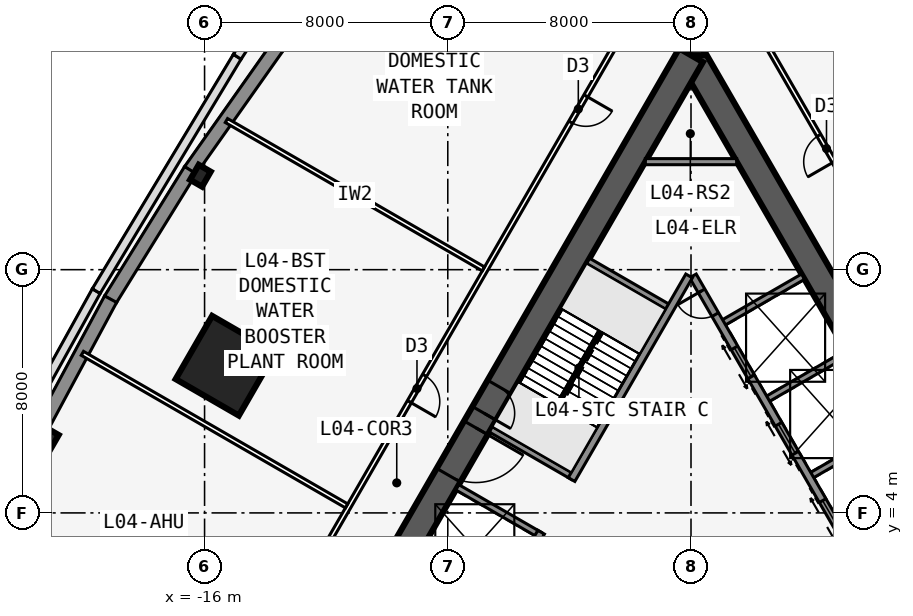
"""IFC4 building model, lengths in metres.
Left out: names, types, materials, properties, quantities, classifications, styles, units other than length and angle.
Written with IfcOpenShell. Run it as: python <this file> out.ifc"""

import sys

from ifc_helpers import new_model, si_unit, direction, frame, frame_2d, origin, origin_2d, place, context, subcontext, project, spatial, polyline, rectangle, i_section, outline, extrude, element, fill, save


model = new_model("IFC4")
c1 = context("Model", 3, precision=1e-05, world=origin(), true_north=direction((0.0, 1.0)))
c2 = subcontext(c1, "Body", "Model", "MODEL_VIEW")
j1 = project(units=[si_unit("LENGTHUNIT", "METRE"), si_unit("PLANEANGLEUNIT", "RADIAN")], contexts=[c1])
p1 = place(None, origin())
s1 = spatial("IfcSite", under=j1, at=p1, CompositionType="ELEMENT")
p2 = place(p1, origin())
s2 = spatial("IfcBuilding", under=s1, at=p2, CompositionType="ELEMENT")
p3 = place(p2, frame((0.0, 0.0, 22.5)))
s3 = spatial("IfcBuildingStorey", under=s2, at=p3, CompositionType="ELEMENT", Elevation=22.5)
p4 = place(p3, frame((16.5, -9.526, 0.0), z_axis=(0.0, 0.0, 1.0), x_axis=(-0.499999749417, 0.866025548458, 0.0)))
e1 = element("IfcWall", 1, at=p4, inside=s3, PredefinedType="SHEAR", context=c2, shape_type="SweptSolid", body=[
    extrude(rectangle(XDim=33.0, YDim=0.9, at=frame_2d((16.5, 0.0))), origin(), (0.0, 0.0, 1.0), 6.0),
])
p5 = place(p4, frame((14.15, 0.0, 0.0)))
e2 = element("IfcOpeningElement", 2, at=p5, cuts=e1, PredefinedType="OPENING", context=c2, shape_type="SweptSolid", body=[
    extrude(rectangle(XDim=1.8, YDim=2.13, at=frame_2d((0.9, 1.065))), frame((0.0, 0.46, 0.0), z_axis=(0.0, -1.0, 0.0), x_axis=(1.0, 0.0, 0.0)), (0.0, 0.0, 1.0), 0.92),
])
p6 = place(p4, frame((12.6, 0.0, 0.0)))
e3 = element("IfcOpeningElement", 3, at=p6, cuts=e1, PredefinedType="OPENING", context=c2, shape_type="SweptSolid", body=[
    extrude(rectangle(XDim=1.0, YDim=2.13, at=frame_2d((0.5, 1.065))), frame((0.0, 0.46, 0.0), z_axis=(0.0, -1.0, 0.0), x_axis=(1.0, 0.0, 0.0)), (0.0, 0.0, 1.0), 0.92),
])
p7 = place(p3, frame((5.379, 2.586, 0.0), z_axis=(0.0, 0.0, 1.0), x_axis=(-0.500001375892, 0.866024609411, 0.0)))
e4 = element("IfcWall", 4, at=p7, inside=s3, PredefinedType="SOLIDWALL", context=c2, shape_type="SweptSolid", body=[
    extrude(rectangle(XDim=10.633, YDim=0.25, at=frame_2d((5.316, 0.0))), origin(), (0.0, 0.0, 1.0), 5.835),
])
p8 = place(p7, frame((9.164, 0.0, 0.0)))
e5 = element("IfcOpeningElement", 5, at=p8, cuts=e4, PredefinedType="OPENING", context=c2, shape_type="SweptSolid", body=[
    extrude(rectangle(XDim=0.9, YDim=2.13, at=frame_2d((0.45, 1.065))), frame((0.0, 0.135, 0.0), z_axis=(0.0, -1.0, 0.0), x_axis=(1.0, 0.0, 0.0)), (0.0, 0.0, 1.0), 0.27),
])
p9 = place(p7, frame((1.0, 0.0, 0.0)))
e6 = element("IfcOpeningElement", 6, at=p9, cuts=e4, PredefinedType="OPENING", context=c2, shape_type="SweptSolid", body=[
    extrude(rectangle(XDim=1.1, YDim=2.13, at=frame_2d((0.55, 1.065))), frame((0.0, 0.135, 0.0), z_axis=(0.0, -1.0, 0.0), x_axis=(1.0, 0.0, 0.0)), (0.0, 0.0, 1.0), 0.27),
])
p10 = place(p7, frame((3.9, 0.0, 0.0)))
e7 = element("IfcOpeningElement", 7, at=p10, cuts=e4, PredefinedType="OPENING", context=c2, shape_type="SweptSolid", body=[
    extrude(rectangle(XDim=1.1, YDim=2.13, at=frame_2d((0.55, 1.065))), frame((0.0, 0.135, 0.0), z_axis=(0.0, -1.0, 0.0), x_axis=(1.0, 0.0, 0.0)), (0.0, 0.0, 1.0), 0.27),
])
p11 = place(p7, frame((6.8, 0.0, 0.0)))
e8 = element("IfcOpeningElement", 8, at=p11, cuts=e4, PredefinedType="OPENING", context=c2, shape_type="SweptSolid", body=[
    extrude(rectangle(XDim=1.1, YDim=2.13, at=frame_2d((0.55, 1.065))), frame((0.0, 0.135, 0.0), z_axis=(0.0, -1.0, 0.0), x_axis=(1.0, 0.0, 0.0)), (0.0, 0.0, 1.0), 0.27),
])
for number, where, z_axis, x_axis in (
    (9, (3.879, 5.184, 0.0), (0.0, 0.0, 1.0), (0.866, 0.5, 0.0)),
    (10, (2.429, 7.696, 0.0), (0.0, 0.0, 1.0), (0.866, 0.5, 0.0)),
    (11, (0.979, 10.207, 0.0), (0.0, 0.0, 1.0), (0.866, 0.5, 0.0)),
):
    element("IfcWall", number, at=place(p3, frame(where, z_axis=z_axis, x_axis=x_axis)), inside=s3, PredefinedType="SOLIDWALL", context=c2, shape_type="SweptSolid", body=[
        extrude(rectangle(XDim=3.125, YDim=0.2, at=frame_2d((1.562, 0.0))), origin(), (0.0, 0.0, 1.0), 5.835),
    ])
p12 = place(p3, frame((0.0, 19.052, 0.0), z_axis=(0.0, 0.0, 1.0), x_axis=(-0.499999749417, -0.866025548458, 0.0)))
e12 = element("IfcWall", 12, at=p12, inside=s3, PredefinedType="SHEAR", context=c2, shape_type="SweptSolid", body=[
    extrude(rectangle(XDim=33.0, YDim=0.9, at=frame_2d((16.5, 0.0))), origin(), (0.0, 0.0, 1.0), 6.0),
])
p13 = place(p12, frame((14.15, 0.0, 0.0)))
e13 = element("IfcOpeningElement", 13, at=p13, cuts=e12, PredefinedType="OPENING", context=c2, shape_type="SweptSolid", body=[
    extrude(rectangle(XDim=1.8, YDim=2.13, at=frame_2d((0.9, 1.065))), frame((0.0, 0.46, 0.0), z_axis=(0.0, -1.0, 0.0), x_axis=(1.0, 0.0, 0.0)), (0.0, 0.0, 1.0), 0.92),
])
p14 = place(p12, frame((12.6, 0.0, 0.0)))
e14 = element("IfcOpeningElement", 14, at=p14, cuts=e12, PredefinedType="OPENING", context=c2, shape_type="SweptSolid", body=[
    extrude(rectangle(XDim=1.0, YDim=2.13, at=frame_2d((0.5, 1.065))), frame((0.0, 0.46, 0.0), z_axis=(0.0, -1.0, 0.0), x_axis=(1.0, 0.0, 0.0)), (0.0, 0.0, 1.0), 0.92),
])
p15 = place(p3, frame((-0.062, 11.794, 0.0), z_axis=(0.0, 0.0, 1.0), x_axis=(-0.500006680225, -0.86602154692, 0.0)))
e15 = element("IfcWall", 15, at=p15, inside=s3, PredefinedType="SOLIDWALL", context=c2, shape_type="SweptSolid", body=[
    extrude(rectangle(XDim=7.733, YDim=0.25, at=frame_2d((3.866, 0.0))), origin(), (0.0, 0.0, 1.0), 5.835),
])
p16 = place(p3, frame((-4.929, 3.365, 0.0), z_axis=(0.0, 0.0, 1.0), x_axis=(-0.499991433582, -0.866030349552, 0.0)))
e16 = element("IfcWall", 16, at=p16, inside=s3, PredefinedType="SOLIDWALL", context=c2, shape_type="SweptSolid", body=[
    extrude(rectangle(XDim=10.633, YDim=0.25, at=frame_2d((5.316, 0.0))), origin(), (0.0, 0.0, 1.0), 5.835),
])
p17 = place(p16, frame((9.164, 0.0, 0.0)))
e17 = element("IfcOpeningElement", 17, at=p17, cuts=e16, PredefinedType="OPENING", context=c2, shape_type="SweptSolid", body=[
    extrude(rectangle(XDim=0.9, YDim=2.13, at=frame_2d((0.45, 1.065))), frame((0.0, 0.135, 0.0), z_axis=(0.0, -1.0, 0.0), x_axis=(1.0, 0.0, 0.0)), (0.0, 0.0, 1.0), 0.27),
])
for number, where, z_axis, x_axis in (
    (18, (-0.679, 10.727, 0.0), (0.0, 0.0, 1.0), (-0.866, 0.5, 0.0)),
    (19, (-3.879, 5.184, 0.0), (0.0, 0.0, 1.0), (-0.866, 0.5, 0.0)),
    (20, (-4.979, 3.279, 0.0), (0.0, 0.0, 1.0), (-0.866, 0.5, 0.0)),
):
    element("IfcWall", number, at=place(p3, frame(where, z_axis=z_axis, x_axis=x_axis)), inside=s3, PredefinedType="SOLIDWALL", context=c2, shape_type="SweptSolid", body=[
        extrude(rectangle(XDim=3.125, YDim=0.2, at=frame_2d((1.562, 0.0))), origin(), (0.0, 0.0, 1.0), 5.835),
    ])
p18 = place(p3, frame((0.0, 19.052, 0.0), z_axis=(0.0, 0.0, 1.0), x_axis=(0.0, 1.0, 0.0)))
e21 = element("IfcWall", 21, at=p18, inside=s3, PredefinedType="SHEAR", context=c2, shape_type="SweptSolid", body=[
    extrude(rectangle(XDim=4.746, YDim=0.9, at=frame_2d((2.373, 0.0))), origin(), (0.0, 0.0, 1.0), 6.0),
])
p19 = place(p18, frame((1.8, 0.0, 0.0)))
e22 = element("IfcOpeningElement", 22, at=p19, cuts=e21, PredefinedType="OPENING", context=c2, shape_type="SweptSolid", body=[
    extrude(rectangle(XDim=1.8, YDim=2.13, at=frame_2d((0.9, 1.065))), frame((0.0, 0.46, 0.0), z_axis=(0.0, -1.0, 0.0), x_axis=(1.0, 0.0, 0.0)), (0.0, 0.0, 1.0), 0.92),
])
for number, where, z_axis, x_axis in (
    (23, (-16.137, 15.09, 0.0), (0.0, 0.0, 1.0), (-0.866, 0.5, 0.0)),
    (24, (-21.137, 6.43, 0.0), (0.0, 0.0, 1.0), (-0.866, 0.5, 0.0)),
):
    element("IfcColumn", number, at=place(p3, frame(where, z_axis=z_axis, x_axis=x_axis)), inside=s3, PredefinedType="COLUMN", context=c2, shape_type="SweptSolid", body=[
        extrude(i_section(OverallWidth=0.455, OverallDepth=0.569, WebThickness=0.078, FlangeThickness=0.125, at=origin_2d()), origin(), (0.0, 0.0, 1.0), 6.0),
    ])
p20 = place(p3, frame((-15.312, 8.84, 0.0), z_axis=(0.0, 0.0, 1.0), x_axis=(-0.866025403784, 0.5, 0.0)))
e25 = element("IfcColumn", 25, at=p20, inside=s3, PredefinedType="COLUMN", context=c2, shape_type="SweptSolid", body=[
    extrude(rectangle(XDim=2.4, YDim=2.4, at=origin_2d()), origin(), (0.0, 0.0, 1.0), 6.0),
])
p21 = place(p3, frame((-13.578, 19.363, 0.0), z_axis=(0.0, 0.0, 1.0), x_axis=(-0.5766431066, -0.81699616132, 0.0)))
e26 = element("IfcWall", 26, at=p21, inside=s3, PredefinedType="SOLIDWALL", context=c2, shape_type="SweptSolid", body=[
    extrude(outline(polyline([(0.0, 0.0), (5.021, 0.0), (5.021, 5.835), (0.0, 5.835), (0.0, 0.0)]), holes=[polyline([(4.41, 2.917), (4.346, 3.409), (4.156, 3.867), (3.854, 4.261), (3.46, 4.563), (3.002, 4.753), (2.51, 4.817), (2.019, 4.753), (1.56, 4.563), (1.167, 4.261), (0.865, 3.867), (0.675, 3.409), (0.61, 2.917), (0.675, 2.426), (0.865, 1.968), (1.167, 1.574), (1.56, 1.272), (2.019, 1.082), (2.51, 1.018), (3.002, 1.082), (3.46, 1.272), (3.854, 1.574), (4.156, 1.968), (4.346, 2.426), (4.41, 2.917)])]), frame((0.0, 0.225, 0.0), z_axis=(0.0, -1.0, 0.0), x_axis=(1.0, 0.0, 0.0)), (0.0, 0.0, 1.0), 0.45),
])
p22 = place(p3, frame((-16.466, 15.272, 0.0), z_axis=(0.0, 0.0, 1.0), x_axis=(-0.52611097126, -0.850415925251, 0.0)))
e27 = element("IfcWall", 27, at=p22, inside=s3, PredefinedType="SOLIDWALL", context=c2, shape_type="SweptSolid", body=[
    extrude(outline(polyline([(0.0, 0.0), (5.002, 0.0), (5.002, 5.835), (0.0, 5.835), (0.0, 0.0)]), holes=[polyline([(4.401, 2.917), (4.336, 3.409), (4.146, 3.867), (3.844, 4.261), (3.451, 4.563), (2.993, 4.753), (2.501, 4.817), (2.01, 4.753), (1.551, 4.563), (1.158, 4.261), (0.856, 3.867), (0.666, 3.409), (0.601, 2.917), (0.666, 2.426), (0.856, 1.968), (1.158, 1.574), (1.551, 1.272), (2.01, 1.082), (2.501, 1.018), (2.993, 1.082), (3.451, 1.272), (3.844, 1.574), (4.146, 1.968), (4.336, 2.426), (4.401, 2.917)])]), frame((0.0, 0.225, 0.0), z_axis=(0.0, -1.0, 0.0), x_axis=(1.0, 0.0, 0.0)), (0.0, 0.0, 1.0), 0.45),
])
p23 = place(p3, frame((-19.09, 11.03, 0.0), z_axis=(0.0, 0.0, 1.0), x_axis=(-0.473412820489, -0.880840678782, 0.0)))
e28 = element("IfcWall", 28, at=p23, inside=s3, PredefinedType="SOLIDWALL", context=c2, shape_type="SweptSolid", body=[
    extrude(outline(polyline([(0.0, 0.0), (5.002, 0.0), (5.002, 5.835), (0.0, 5.835), (0.0, 0.0)]), holes=[polyline([(4.401, 2.917), (4.336, 3.409), (4.146, 3.867), (3.845, 4.261), (3.451, 4.563), (2.993, 4.753), (2.501, 4.817), (2.01, 4.753), (1.551, 4.563), (1.158, 4.261), (0.856, 3.867), (0.666, 3.409), (0.601, 2.917), (0.666, 2.426), (0.856, 1.968), (1.158, 1.574), (1.551, 1.272), (2.01, 1.082), (2.501, 1.018), (2.993, 1.082), (3.451, 1.272), (3.845, 1.574), (4.146, 1.968), (4.336, 2.426), (4.401, 2.917)])]), frame((0.0, 0.225, 0.0), z_axis=(0.0, -1.0, 0.0), x_axis=(1.0, 0.0, 0.0)), (0.0, 0.0, 1.0), 0.45),
])
p24 = place(p3, frame((-23.92, 3.424, 0.0), z_axis=(0.0, 0.0, 1.0), x_axis=(0.484315141127, 0.874893618719, 0.0)))
e29 = element("IfcWall", 29, at=p24, inside=s3, PredefinedType="PARAPET", context=c2, shape_type="SweptSolid", body=[
    extrude(rectangle(XDim=8.996, YDim=0.3, at=frame_2d((4.498, 0.0))), origin(), (0.0, 0.0, 1.0), 1.1),
])
p25 = place(p3, frame((-19.563, 11.295, 0.0), z_axis=(0.0, 0.0, 1.0), x_axis=(0.515513067343, 0.856881717274, 0.0)))
e30 = element("IfcWall", 30, at=p25, inside=s3, PredefinedType="PARAPET", context=c2, shape_type="SweptSolid", body=[
    extrude(rectangle(XDim=8.996, YDim=0.3, at=frame_2d((4.498, 0.0))), origin(), (0.0, 0.0, 1.0), 1.1),
])
p26 = place(p3, frame((-14.925, 19.003, 0.0), z_axis=(0.0, 0.0, 1.0), x_axis=(0.545976753286, 0.83780032518, 0.0)))
e31 = element("IfcWall", 31, at=p26, inside=s3, PredefinedType="PARAPET", context=c2, shape_type="SweptSolid", body=[
    extrude(rectangle(XDim=9.009, YDim=0.3, at=frame_2d((4.504, 0.0))), origin(), (0.0, 0.0, 1.0), 1.1),
])
p27 = place(p3, frame((20.027, -10.985, 0.0), z_axis=(0.0, 0.0, 1.0), x_axis=(-0.500001677587, 0.866024435227, 0.0)))
e32 = element("IfcWall", 32, at=p27, inside=s3, PredefinedType="PARTITIONING", context=c2, shape_type="SweptSolid", body=[
    extrude(rectangle(XDim=39.054, YDim=0.15, at=frame_2d((19.527, 0.0))), origin(), (0.0, 0.0, 1.0), 5.835),
])
p28 = place(p27, frame((6.914, 0.0, 0.0)))
e33 = element("IfcOpeningElement", 33, at=p28, cuts=e32, PredefinedType="OPENING", context=c2, shape_type="SweptSolid", body=[
    extrude(rectangle(XDim=1.0, YDim=2.13, at=frame_2d((0.5, 1.065))), frame((0.0, 0.085, 0.0), z_axis=(0.0, -1.0, 0.0), x_axis=(1.0, 0.0, 0.0)), (0.0, 0.0, 1.0), 0.17),
])
p29 = place(p27, frame((18.527, 0.0, 0.0)))
e34 = element("IfcOpeningElement", 34, at=p29, cuts=e32, PredefinedType="OPENING", context=c2, shape_type="SweptSolid", body=[
    extrude(rectangle(XDim=1.0, YDim=2.13, at=frame_2d((0.5, 1.065))), frame((0.0, 0.085, 0.0), z_axis=(0.0, -1.0, 0.0), x_axis=(1.0, 0.0, 0.0)), (0.0, 0.0, 1.0), 0.17),
])
p30 = place(p27, frame((30.64, 0.0, 0.0)))
e35 = element("IfcOpeningElement", 35, at=p30, cuts=e32, PredefinedType="OPENING", context=c2, shape_type="SweptSolid", body=[
    extrude(rectangle(XDim=1.0, YDim=2.13, at=frame_2d((0.5, 1.065))), frame((0.0, 0.085, 0.0), z_axis=(0.0, -1.0, 0.0), x_axis=(1.0, 0.0, 0.0)), (0.0, 0.0, 1.0), 0.17),
])
p31 = place(p3, frame((-0.5, 22.836, 0.0), z_axis=(0.0, 0.0, 1.0), x_axis=(-0.500001677587, -0.866024435227, 0.0)))
e36 = element("IfcWall", 36, at=p31, inside=s3, PredefinedType="PARTITIONING", context=c2, shape_type="SweptSolid", body=[
    extrude(rectangle(XDim=39.054, YDim=0.15, at=frame_2d((19.527, 0.0))), origin(), (0.0, 0.0, 1.0), 5.835),
])
p32 = place(p31, frame((5.914, 0.0, 0.0)))
e37 = element("IfcOpeningElement", 37, at=p32, cuts=e36, PredefinedType="OPENING", context=c2, shape_type="SweptSolid", body=[
    extrude(rectangle(XDim=1.0, YDim=2.13, at=frame_2d((0.5, 1.065))), frame((0.0, 0.085, 0.0), z_axis=(0.0, -1.0, 0.0), x_axis=(1.0, 0.0, 0.0)), (0.0, 0.0, 1.0), 0.17),
])
p33 = place(p31, frame((16.527, 0.0, 0.0)))
e38 = element("IfcOpeningElement", 38, at=p33, cuts=e36, PredefinedType="OPENING", context=c2, shape_type="SweptSolid", body=[
    extrude(rectangle(XDim=1.0, YDim=2.13, at=frame_2d((0.5, 1.065))), frame((0.0, 0.085, 0.0), z_axis=(0.0, -1.0, 0.0), x_axis=(1.0, 0.0, 0.0)), (0.0, 0.0, 1.0), 0.17),
])
p34 = place(p31, frame((29.64, 0.0, 0.0)))
e39 = element("IfcOpeningElement", 39, at=p34, cuts=e36, PredefinedType="OPENING", context=c2, shape_type="SweptSolid", body=[
    extrude(rectangle(XDim=1.0, YDim=2.13, at=frame_2d((0.5, 1.065))), frame((0.0, 0.085, 0.0), z_axis=(0.0, -1.0, 0.0), x_axis=(1.0, 0.0, 0.0)), (0.0, 0.0, 1.0), 0.17),
])
p35 = place(p3, frame((-6.829, 12.025, 0.0), z_axis=(0.0, 0.0, 1.0), x_axis=(-0.866025631456, 0.499999605661, 0.0)))
e40 = element("IfcWall", 40, at=p35, inside=s3, PredefinedType="PARTITIONING", context=c2, shape_type="SweptSolid", body=[
    extrude(rectangle(XDim=9.76, YDim=0.15, at=frame_2d((4.88, 0.0))), origin(), (0.0, 0.0, 1.0), 5.835),
])
p36 = place(p3, frame((-11.329, 4.231, 0.0), z_axis=(0.0, 0.0, 1.0), x_axis=(-0.866024745713, 0.500001139812, 0.0)))
e41 = element("IfcWall", 41, at=p36, inside=s3, PredefinedType="PARTITIONING", context=c2, shape_type="SweptSolid", body=[
    extrude(rectangle(XDim=10.035, YDim=0.15, at=frame_2d((5.018, 0.0))), origin(), (0.0, 0.0, 1.0), 5.835),
])
p37 = place(p3, frame((-1.501, 15.552, 0.0), z_axis=(0.0, 0.0, 1.0), x_axis=(1.0, 0.0, 0.0)))
e42 = element("IfcWall", 42, at=p37, inside=s3, PredefinedType="SOLIDWALL", context=c2, shape_type="SweptSolid", body=[
    extrude(rectangle(XDim=3.002, YDim=0.2, at=frame_2d((1.501, 0.0))), origin(), (0.0, 0.0, 1.0), 5.835),
])
p38 = place(p3, frame((-2.988, 9.978, 0.0), z_axis=(0.0, 0.0, 1.0), x_axis=(-0.499992232847, -0.866029888106, 0.0)))
e43 = element("IfcWall", 43, at=p38, inside=s3, PredefinedType="SOLIDWALL", context=c2, shape_type="SweptSolid", body=[
    extrude(rectangle(XDim=2.794, YDim=0.1, at=frame_2d((1.397, 0.0))), origin(), (0.0, 0.0, 1.0), 6.0),
])
p39 = place(p30, origin())
e44 = element("IfcDoor", 44, at=p39, inside=s3, OperationType="SINGLE_SWING_LEFT", PredefinedType="DOOR", context=c2, shape_type="SweptSolid", body=[
    extrude(rectangle(XDim=1.0, YDim=2.13, at=frame_2d((0.5, 1.065))), frame((0.0, 0.025, 0.0), z_axis=(0.0, -1.0, 0.0), x_axis=(1.0, 0.0, 0.0)), (0.0, 0.0, 1.0), 0.05),
])
fill(e35, e44)
p40 = place(p32, origin())
e45 = element("IfcDoor", 45, at=p40, inside=s3, OperationType="SINGLE_SWING_LEFT", PredefinedType="DOOR", context=c2, shape_type="SweptSolid", body=[
    extrude(rectangle(XDim=1.0, YDim=2.13, at=frame_2d((0.5, 1.065))), frame((0.0, 0.025, 0.0), z_axis=(0.0, -1.0, 0.0), x_axis=(1.0, 0.0, 0.0)), (0.0, 0.0, 1.0), 0.05),
])
fill(e37, e45)
p41 = place(p33, origin())
e46 = element("IfcDoor", 46, at=p41, inside=s3, OperationType="SINGLE_SWING_RIGHT", PredefinedType="DOOR", context=c2, shape_type="SweptSolid", body=[
    extrude(rectangle(XDim=1.0, YDim=2.13, at=frame_2d((0.5, 1.065))), frame((0.0, 0.025, 0.0), z_axis=(0.0, -1.0, 0.0), x_axis=(1.0, 0.0, 0.0)), (0.0, 0.0, 1.0), 0.05),
])
fill(e38, e46)
p42 = place(p13, origin())
e47 = element("IfcDoor", 47, at=p42, inside=s3, OperationType="DOUBLE_DOOR_SINGLE_SWING", PredefinedType="DOOR", context=c2, shape_type="SweptSolid", body=[
    extrude(rectangle(XDim=1.8, YDim=2.13, at=frame_2d((0.9, 1.065))), frame((0.0, 0.025, 0.0), z_axis=(0.0, -1.0, 0.0), x_axis=(1.0, 0.0, 0.0)), (0.0, 0.0, 1.0), 0.05),
])
fill(e13, e47)
p43 = place(p14, origin())
e48 = element("IfcDoor", 48, at=p43, inside=s3, OperationType="SINGLE_SWING_RIGHT", PredefinedType="DOOR", context=c2, shape_type="SweptSolid", body=[
    extrude(rectangle(XDim=1.0, YDim=2.13, at=frame_2d((0.5, 1.065))), frame((0.0, 0.025, 0.0), z_axis=(0.0, -1.0, 0.0), x_axis=(1.0, 0.0, 0.0)), (0.0, 0.0, 1.0), 0.05),
])
fill(e14, e48)
p44 = place(p8, origin())
e49 = element("IfcDoor", 49, at=p44, inside=s3, OperationType="SINGLE_SWING_RIGHT", PredefinedType="DOOR", context=c2, shape_type="SweptSolid", body=[
    extrude(rectangle(XDim=0.9, YDim=2.13, at=frame_2d((0.45, 1.065))), frame((0.0, 0.025, 0.0), z_axis=(0.0, -1.0, 0.0), x_axis=(1.0, 0.0, 0.0)), (0.0, 0.0, 1.0), 0.05),
])
fill(e5, e49)
p45 = place(p9, origin())
e50 = element("IfcDoor", 50, at=p45, inside=s3, OperationType="DOUBLE_DOOR_SLIDING", PredefinedType="USERDEFINED", context=c2, shape_type="SweptSolid", body=[
    extrude(rectangle(XDim=1.1, YDim=2.13, at=frame_2d((0.55, 1.065))), frame((0.0, 0.025, 0.0), z_axis=(0.0, -1.0, 0.0), x_axis=(1.0, 0.0, 0.0)), (0.0, 0.0, 1.0), 0.05),
])
fill(e6, e50)
p46 = place(p10, origin())
e51 = element("IfcDoor", 51, at=p46, inside=s3, OperationType="DOUBLE_DOOR_SLIDING", PredefinedType="USERDEFINED", context=c2, shape_type="SweptSolid", body=[
    extrude(rectangle(XDim=1.1, YDim=2.13, at=frame_2d((0.55, 1.065))), frame((0.0, 0.025, 0.0), z_axis=(0.0, -1.0, 0.0), x_axis=(1.0, 0.0, 0.0)), (0.0, 0.0, 1.0), 0.05),
])
fill(e7, e51)
p47 = place(p11, origin())
e52 = element("IfcDoor", 52, at=p47, inside=s3, OperationType="DOUBLE_DOOR_SLIDING", PredefinedType="USERDEFINED", context=c2, shape_type="SweptSolid", body=[
    extrude(rectangle(XDim=1.1, YDim=2.13, at=frame_2d((0.55, 1.065))), frame((0.0, 0.025, 0.0), z_axis=(0.0, -1.0, 0.0), x_axis=(1.0, 0.0, 0.0)), (0.0, 0.0, 1.0), 0.05),
])
fill(e8, e52)
save(model, sys.argv[1])
